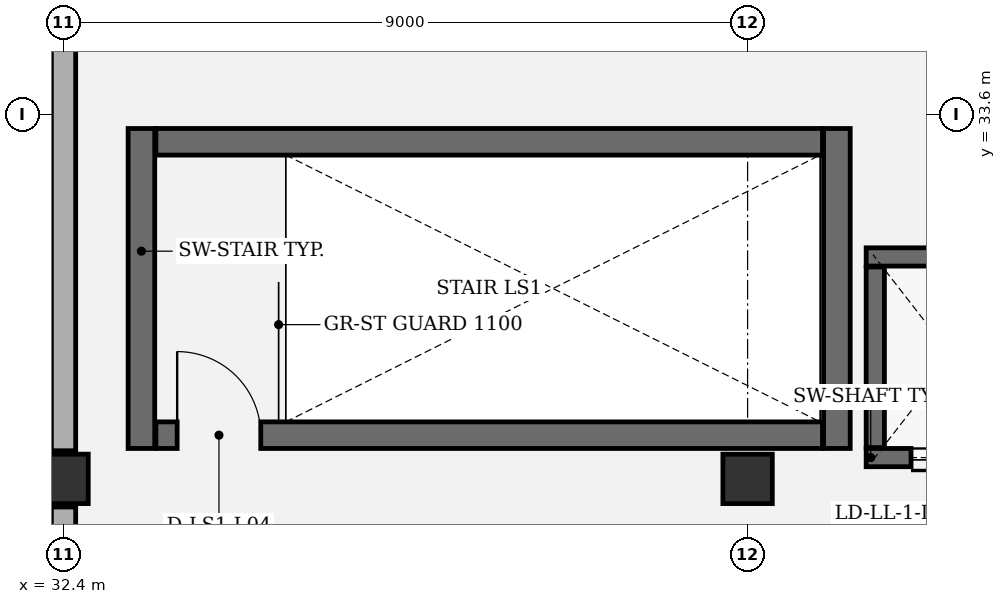
"""IFC4 building model, lengths in metres.
Left out: names, types, materials, properties, quantities, classifications, styles, units other than length and angle.
Written with IfcOpenShell. Run it as: python <this file> out.ifc"""

import sys

from ifc_helpers import new_model, si_unit, direction, frame, frame_2d, origin, origin_2d, place, context, subcontext, project, spatial, rectangle, extrude, element, fill, save


model = new_model("IFC4")
c1 = context("Model", 3, precision=1e-05, world=origin(), true_north=direction((0.0, 1.0)))
c2 = subcontext(c1, "Body", "Model", "MODEL_VIEW")
j1 = project(units=[si_unit("LENGTHUNIT", "METRE"), si_unit("PLANEANGLEUNIT", "RADIAN")], contexts=[c1])
p1 = place(None, origin())
s1 = spatial("IfcSite", under=j1, at=p1, CompositionType="ELEMENT")
p2 = place(p1, origin())
s2 = spatial("IfcBuilding", under=s1, at=p2, CompositionType="ELEMENT")
p3 = place(p2, frame((0.0, 0.0, 22.0)))
s3 = spatial("IfcBuildingStorey", under=s2, at=p3, CompositionType="ELEMENT", Elevation=22.0)
for number, where, z_axis, x_axis in (
    (1, (32.4, 28.8, 0.0), (0.0, 0.0, 1.0), (1.0, 0.0, 0.0)),
    (2, (41.4, 28.8, 0.0), (0.0, 0.0, 1.0), (1.0, 0.0, 0.0)),
):
    element("IfcColumn", number, at=place(p3, frame(where, z_axis=z_axis, x_axis=x_axis)), inside=s3, PredefinedType="COLUMN", context=c2, shape_type="SweptSolid", body=[
        extrude(rectangle(XDim=0.65, YDim=0.65, at=origin_2d()), origin(), (0.0, 0.0, 1.0), 7.094),
    ])
p4 = place(p3, frame((32.4, 19.57, 0.0), z_axis=(0.0, 0.0, 1.0), x_axis=(0.0, 1.0, 0.0)))
e3 = element("IfcWall", 3, at=p4, inside=s3, PredefinedType="SOLIDWALL", context=c2, shape_type="SweptSolid", body=[
    extrude(rectangle(XDim=8.86, YDim=0.32, at=frame_2d((4.43, 0.0))), origin(), (0.0, 0.0, 1.0), 4.7),
])
p5 = place(p3, frame((32.4, 29.17, 0.0), z_axis=(0.0, 0.0, 1.0), x_axis=(0.0, 1.0, 0.0)))
e4 = element("IfcWall", 4, at=p5, inside=s3, PredefinedType="SOLIDWALL", context=c2, shape_type="SweptSolid", body=[
    extrude(rectangle(XDim=8.86, YDim=0.32, at=frame_2d((4.43, 0.0))), origin(), (0.0, 0.0, 1.0), 4.7),
])
for number, where, z_axis, x_axis in (
    (5, (33.425, 33.41, 0.0), (0.0, 0.0, 1.0), (0.0, -1.0, 0.0)),
    (6, (42.575, 29.2, 0.0), (0.0, 0.0, 1.0), (0.0, 1.0, 0.0)),
):
    element("IfcWall", number, at=place(p3, frame(where, z_axis=z_axis, x_axis=x_axis)), inside=s3, PredefinedType="SHEAR", context=c2, shape_type="SweptSolid", body=[
        extrude(rectangle(XDim=4.21, YDim=0.35, at=frame_2d((2.105, 0.0))), origin(), (0.0, 0.0, 1.0), 4.75),
    ])
p6 = place(p3, frame((33.615, 29.375, 0.0), z_axis=(0.0, 0.0, 1.0), x_axis=(1.0, 0.0, 0.0)))
e7 = element("IfcWall", 7, at=p6, inside=s3, PredefinedType="SHEAR", context=c2, shape_type="SweptSolid", body=[
    extrude(rectangle(XDim=8.77, YDim=0.35, at=frame_2d((4.385, 0.0))), origin(), (0.0, 0.0, 1.0), 4.75),
])
p7 = place(p6, frame((0.28, 0.0, 0.0)))
e8 = element("IfcOpeningElement", 8, at=p7, cuts=e7, PredefinedType="OPENING", context=c2, shape_type="SweptSolid", body=[
    extrude(rectangle(XDim=1.1, YDim=2.2, at=frame_2d((0.55, 1.1))), frame((0.0, 0.185, 0.0), z_axis=(0.0, -1.0, 0.0), x_axis=(1.0, 0.0, 0.0)), (0.0, 0.0, 1.0), 0.37),
])
p8 = place(p3, frame((42.385, 33.235, 0.0), z_axis=(0.0, 0.0, 1.0), x_axis=(-1.0, 0.0, 0.0)))
e9 = element("IfcWall", 9, at=p8, inside=s3, PredefinedType="SHEAR", context=c2, shape_type="SweptSolid", body=[
    extrude(rectangle(XDim=8.77, YDim=0.35, at=frame_2d((4.385, 0.0))), origin(), (0.0, 0.0, 1.0), 4.75),
])
p9 = place(p3, frame((45.24, 29.08, 0.0), z_axis=(0.0, 0.0, 1.0), x_axis=(-1.0, 0.0, 0.0)))
e10 = element("IfcWall", 10, at=p9, inside=s3, PredefinedType="SHEAR", context=c2, shape_type="SweptSolid", body=[
    extrude(rectangle(XDim=2.28, YDim=0.24, at=frame_2d((1.14, 0.0))), origin(), (0.0, 0.0, 1.0), 4.75),
])
p10 = place(p9, frame((0.59, 0.0, 0.0)))
e11 = element("IfcOpeningElement", 11, at=p10, cuts=e10, PredefinedType="OPENING", context=c2, shape_type="SweptSolid", body=[
    extrude(rectangle(XDim=1.1, YDim=2.2, at=frame_2d((0.55, 1.1))), frame((0.0, 0.13, 0.0), z_axis=(0.0, -1.0, 0.0), x_axis=(1.0, 0.0, 0.0)), (0.0, 0.0, 1.0), 0.26),
])
p11 = place(p3, frame((42.96, 31.72, 0.0), z_axis=(0.0, 0.0, 1.0), x_axis=(1.0, 0.0, 0.0)))
e12 = element("IfcWall", 12, at=p11, inside=s3, PredefinedType="SHEAR", context=c2, shape_type="SweptSolid", body=[
    extrude(rectangle(XDim=2.28, YDim=0.24, at=frame_2d((1.14, 0.0))), origin(), (0.0, 0.0, 1.0), 4.75),
])
p12 = place(p3, frame((43.08, 29.212, 0.0), z_axis=(0.0, 0.0, 1.0), x_axis=(0.0, 1.0, 0.0)))
e13 = element("IfcWall", 13, at=p12, inside=s3, PredefinedType="SHEAR", context=c2, shape_type="SweptSolid", body=[
    extrude(rectangle(XDim=2.376, YDim=0.24, at=frame_2d((1.188, 0.0))), origin(), (0.0, 0.0, 1.0), 4.75),
])
p13 = place(p7, origin())
e14 = element("IfcDoor", 14, at=p13, inside=s3, OperationType="SINGLE_SWING_LEFT", PredefinedType="DOOR", context=c2, shape_type="SweptSolid", body=[
    extrude(rectangle(XDim=1.1, YDim=2.2, at=frame_2d((0.55, 1.1))), frame((0.0, 0.025, 0.0), z_axis=(0.0, -1.0, 0.0), x_axis=(1.0, 0.0, 0.0)), (0.0, 0.0, 1.0), 0.05),
])
fill(e8, e14)
p14 = place(p10, origin())
e15 = element("IfcDoor", 15, at=p14, inside=s3, OperationType="DOUBLE_DOOR_SLIDING", PredefinedType="DOOR", context=c2, shape_type="SweptSolid", body=[
    extrude(rectangle(XDim=1.1, YDim=2.2, at=frame_2d((0.55, 1.1))), frame((0.0, 0.025, 0.0), z_axis=(0.0, -1.0, 0.0), x_axis=(1.0, 0.0, 0.0)), (0.0, 0.0, 1.0), 0.05),
])
fill(e11, e15)
save(model, sys.argv[1])
